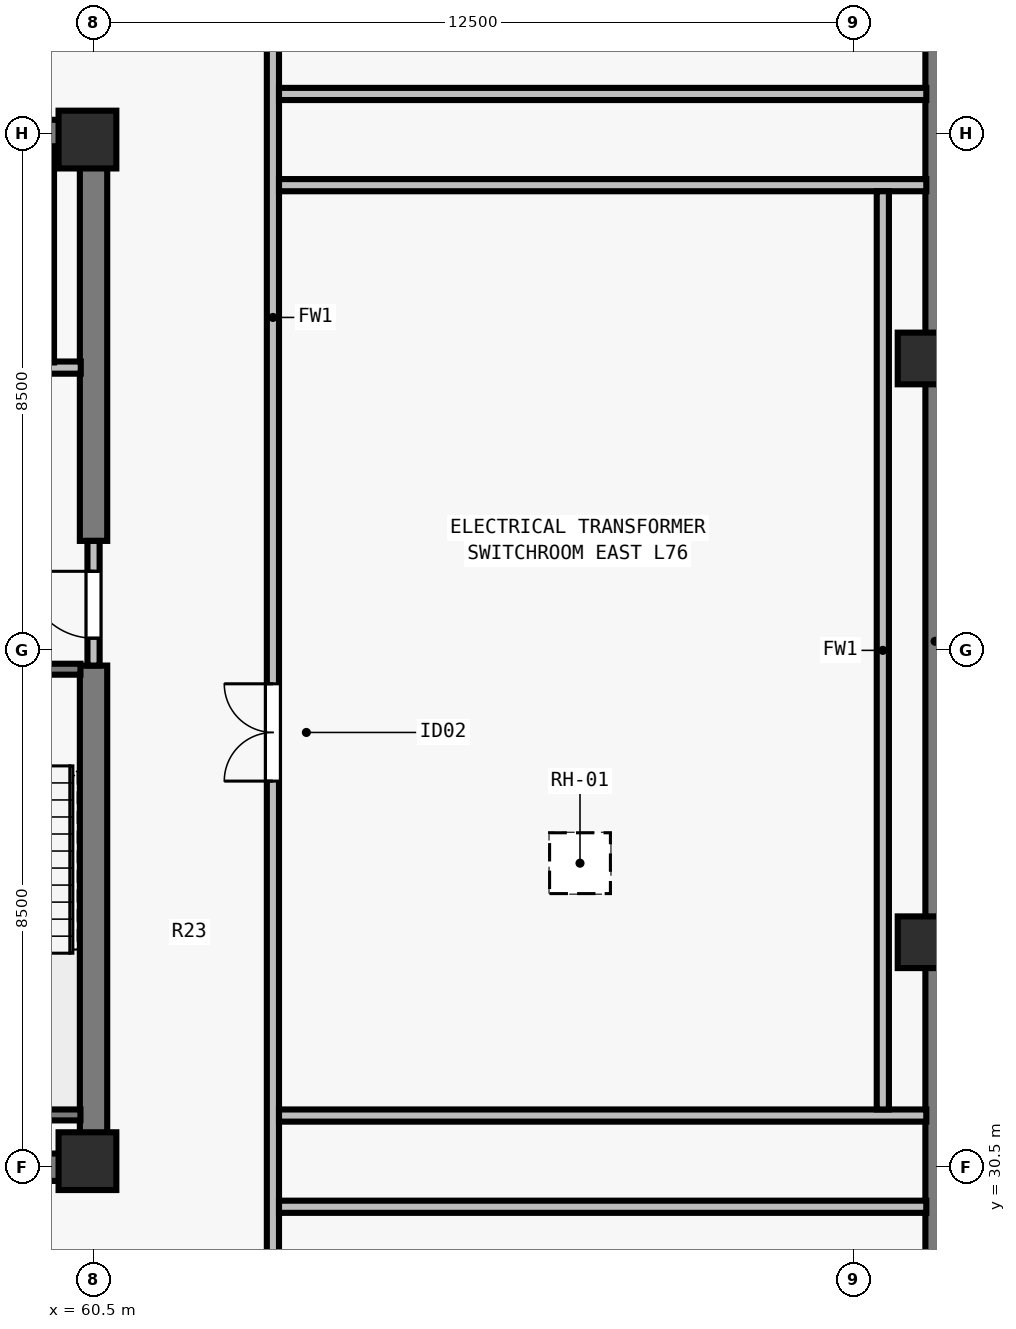
"""IFC4 building model, lengths in metres.
Left out: names, types, materials, properties, quantities, classifications, styles, units other than length and angle.
Written with IfcOpenShell. Run it as: python <this file> out.ifc"""

import sys

from ifc_helpers import new_model, si_unit, direction, frame, frame_2d, origin, origin_2d, place, context, subcontext, project, spatial, rectangle, extrude, element, fill, save


model = new_model("IFC4")
c1 = context("Model", 3, precision=1e-05, world=origin(), true_north=direction((0.0, 1.0)))
c2 = subcontext(c1, "Body", "Model", "MODEL_VIEW")
j1 = project(units=[si_unit("LENGTHUNIT", "METRE"), si_unit("PLANEANGLEUNIT", "RADIAN")], contexts=[c1])
p1 = place(None, origin())
s1 = spatial("IfcSite", under=j1, at=p1, CompositionType="ELEMENT")
p2 = place(p1, origin())
s2 = spatial("IfcBuilding", under=s1, at=p2, CompositionType="ELEMENT")
p3 = place(p2, frame((0.0, 0.0, 276.0)))
s3 = spatial("IfcBuildingStorey", under=s2, at=p3, CompositionType="ELEMENT", Elevation=276.0)
for number, where, z_axis, x_axis in (
    (1, (60.4, 30.6, 0.0), (0.0, 0.0, 1.0), (1.0, 0.0, 0.0)),
    (2, (60.4, 47.4, 0.0), (0.0, 0.0, 1.0), (1.0, 0.0, 0.0)),
):
    element("IfcColumn", number, at=place(p3, frame(where, z_axis=z_axis, x_axis=x_axis)), inside=s3, PredefinedType="COLUMN", context=c2, shape_type="SweptSolid", body=[
        extrude(rectangle(XDim=0.95, YDim=0.95, at=origin_2d()), origin(), (0.0, 0.0, 1.0), 4.5),
    ])
for number, where, z_axis, x_axis in (
    (3, (74.15, 34.2, 0.0), (0.0, 0.0, 1.0), (0.0, 1.0, 0.0)),
    (4, (74.15, 43.8, 0.0), (0.0, 0.0, 1.0), (0.0, 1.0, 0.0)),
):
    element("IfcColumn", number, at=place(p3, frame(where, z_axis=z_axis, x_axis=x_axis)), inside=s3, PredefinedType="COLUMN", context=c2, shape_type="SweptSolid", body=[
        extrude(rectangle(XDim=0.85, YDim=0.85, at=origin_2d()), origin(), (0.0, 0.0, 1.0), 4.5),
    ])
p4 = place(p3, frame((74.34, 56.5, 0.0), z_axis=(0.0, 0.0, 1.0), x_axis=(0.0, -1.0, 0.0)))
e5 = element("IfcWall", 5, at=p4, inside=s3, PredefinedType="SOLIDWALL", context=c2, shape_type="SweptSolid", body=[
    extrude(rectangle(XDim=34.702, YDim=0.32, at=frame_2d((17.351, 0.0))), origin(), (0.0, 0.0, 1.0), 4.29),
])
for number, where, z_axis, x_axis in (
    (6, (43.275, 30.5, 0.0), (0.0, 0.0, 1.0), (1.0, 0.0, 0.0)),
    (7, (43.275, 47.5, 0.0), (0.0, 0.0, 1.0), (1.0, 0.0, 0.0)),
):
    element("IfcWall", number, at=place(p3, frame(where, z_axis=z_axis, x_axis=x_axis)), inside=s3, PredefinedType="SHEAR", context=c2, shape_type="SweptSolid", body=[
        extrude(rectangle(XDim=17.45, YDim=0.45, at=frame_2d((8.725, 0.0))), origin(), (0.0, 0.0, 1.0), 4.29),
    ])
p5 = place(p3, frame((60.5, 30.715, 0.0), z_axis=(0.0, 0.0, 1.0), x_axis=(0.0, 1.0, 0.0)))
e8 = element("IfcWall", 8, at=p5, inside=s3, PredefinedType="SHEAR", context=c2, shape_type="SweptSolid", body=[
    extrude(rectangle(XDim=8.035, YDim=0.45, at=frame_2d((4.018, 0.0))), origin(), (0.0, 0.0, 1.0), 4.29),
])
p6 = place(p3, frame((60.5, 40.8, 0.0), z_axis=(0.0, 0.0, 1.0), x_axis=(0.0, 1.0, 0.0)))
e9 = element("IfcWall", 9, at=p6, inside=s3, PredefinedType="SHEAR", context=c2, shape_type="SweptSolid", body=[
    extrude(rectangle(XDim=6.485, YDim=0.45, at=frame_2d((3.242, 0.0))), origin(), (0.0, 0.0, 1.0), 4.29),
])
p7 = place(p3, frame((60.5, 38.75, 0.0), z_axis=(0.0, 0.0, 1.0), x_axis=(0.0, 1.0, 0.0)))
e10 = element("IfcWall", 10, at=p7, inside=s3, PredefinedType="SOLIDWALL", context=c2, shape_type="SweptSolid", body=[
    extrude(rectangle(XDim=2.05, YDim=0.2, at=frame_2d((1.025, 0.0))), origin(), (0.0, 0.0, 1.0), 4.29),
])
p8 = place(p7, frame((0.45, 0.0, 0.0)))
e11 = element("IfcOpeningElement", 11, at=p8, cuts=e10, PredefinedType="OPENING", context=c2, shape_type="SweptSolid", body=[
    extrude(rectangle(XDim=1.1, YDim=2.15, at=frame_2d((0.55, 1.075))), frame((0.0, 0.11, 0.0), z_axis=(0.0, -1.0, 0.0), x_axis=(1.0, 0.0, 0.0)), (0.0, 0.0, 1.0), 0.22),
])
p9 = place(p3, frame((56.735, 43.65, 0.0), z_axis=(0.0, 0.0, 1.0), x_axis=(1.0, 0.0, 0.0)))
e12 = element("IfcWall", 12, at=p9, inside=s3, PredefinedType="SOLIDWALL", context=c2, shape_type="SweptSolid", body=[
    extrude(rectangle(XDim=3.555, YDim=0.2, at=frame_2d((1.777, 0.0))), origin(), (0.0, 0.0, 1.0), 4.29),
])
p10 = place(p9, frame((1.295, 0.0, 0.0)))
e13 = element("IfcOpeningElement", 13, at=p10, cuts=e12, PredefinedType="OPENING", context=c2, shape_type="SweptSolid", body=[
    extrude(rectangle(XDim=1.1, YDim=2.2, at=frame_2d((0.55, 1.1))), frame((0.0, 0.11, 0.0), z_axis=(0.0, -1.0, 0.0), x_axis=(1.0, 0.0, 0.0)), (0.0, 0.0, 1.0), 0.22),
])
p11 = place(p3, frame((59.75, 43.735, 0.0), z_axis=(0.0, 0.0, 1.0), x_axis=(0.0, 1.0, 0.0)))
e14 = element("IfcWall", 14, at=p11, inside=s3, PredefinedType="SOLIDWALL", context=c2, shape_type="SweptSolid", body=[
    extrude(rectangle(XDim=3.555, YDim=0.2, at=frame_2d((1.777, 0.0))), origin(), (0.0, 0.0, 1.0), 4.29),
])
p12 = place(p3, frame((63.45, 27.65, 0.0), z_axis=(0.0, 0.0, 1.0), x_axis=(0.0, 1.0, 0.0)))
e15 = element("IfcWall", 15, at=p12, inside=s3, PredefinedType="SOLIDWALL", context=c2, shape_type="SweptSolid", body=[
    extrude(rectangle(XDim=22.7, YDim=0.2, at=frame_2d((11.35, 0.0))), origin(), (0.0, 0.0, 1.0), 4.29),
])
p13 = place(p12, frame((9.2, 0.0, 0.0)))
e16 = element("IfcOpeningElement", 16, at=p13, cuts=e15, PredefinedType="OPENING", context=c2, shape_type="SweptSolid", body=[
    extrude(rectangle(XDim=1.6, YDim=2.2, at=frame_2d((0.8, 1.1))), frame((0.0, 0.11, 0.0), z_axis=(0.0, -1.0, 0.0), x_axis=(1.0, 0.0, 0.0)), (0.0, 0.0, 1.0), 0.22),
])
p14 = place(p3, frame((63.55, 29.85, 0.0), z_axis=(0.0, 0.0, 1.0), x_axis=(1.0, 0.0, 0.0)))
e17 = element("IfcWall", 17, at=p14, inside=s3, PredefinedType="SOLIDWALL", context=c2, shape_type="SweptSolid", body=[
    extrude(rectangle(XDim=10.645, YDim=0.2, at=frame_2d((5.323, 0.0))), origin(), (0.0, 0.0, 1.0), 4.29),
])
for number, where, z_axis, x_axis in (
    (18, (63.55, 31.35, 0.0), (0.0, 0.0, 1.0), (1.0, 0.0, 0.0)),
    (19, (63.55, 46.65, 0.0), (0.0, 0.0, 1.0), (1.0, 0.0, 0.0)),
):
    element("IfcWall", number, at=place(p3, frame(where, z_axis=z_axis, x_axis=x_axis)), inside=s3, PredefinedType="SOLIDWALL", context=c2, shape_type="SweptSolid", body=[
        extrude(rectangle(XDim=10.645, YDim=0.2, at=frame_2d((5.323, 0.0))), origin(), (0.0, 0.0, 1.0), 2.465),
    ])
p15 = place(p3, frame((63.55, 48.15, 0.0), z_axis=(0.0, 0.0, 1.0), x_axis=(1.0, 0.0, 0.0)))
e20 = element("IfcWall", 20, at=p15, inside=s3, PredefinedType="SOLIDWALL", context=c2, shape_type="SweptSolid", body=[
    extrude(rectangle(XDim=10.645, YDim=0.2, at=frame_2d((5.323, 0.0))), origin(), (0.0, 0.0, 1.0), 4.29),
])
p16 = place(p3, frame((73.48, 31.45, 0.0), z_axis=(0.0, 0.0, 1.0), x_axis=(0.0, 1.0, 0.0)))
e21 = element("IfcWall", 21, at=p16, inside=s3, PredefinedType="SOLIDWALL", context=c2, shape_type="SweptSolid", body=[
    extrude(rectangle(XDim=15.1, YDim=0.2, at=frame_2d((7.55, 0.0))), origin(), (0.0, 0.0, 1.0), 4.29),
])
p17 = place(p3, frame((57.005, 38.69, 0.0), z_axis=(0.0, 0.0, 1.0), x_axis=(1.0, 0.0, 0.0)))
e22 = element("IfcWall", 22, at=p17, inside=s3, PredefinedType="SOLIDWALL", context=c2, shape_type="SweptSolid", body=[
    extrude(rectangle(XDim=3.28, YDim=0.18, at=frame_2d((1.64, 0.0))), origin(), (0.0, 0.0, 1.0), 4.29),
])
p18 = place(p17, frame((1.165, 0.0, 0.0)))
e23 = element("IfcOpeningElement", 23, at=p18, cuts=e22, PredefinedType="OPENING", context=c2, shape_type="SweptSolid", body=[
    extrude(rectangle(XDim=0.95, YDim=2.15, at=frame_2d((0.475, 1.075))), frame((0.0, 0.1, 0.0), z_axis=(0.0, -1.0, 0.0), x_axis=(1.0, 0.0, 0.0)), (0.0, 0.0, 1.0), 0.2),
])
p19 = place(p3, frame((57.005, 31.36, 0.0), z_axis=(0.0, 0.0, 1.0), x_axis=(1.0, 0.0, 0.0)))
e24 = element("IfcWall", 24, at=p19, inside=s3, PredefinedType="SOLIDWALL", context=c2, shape_type="SweptSolid", body=[
    extrude(rectangle(XDim=3.28, YDim=0.18, at=frame_2d((1.64, 0.0))), origin(), (0.0, 0.0, 1.0), 4.29),
])
p20 = place(p3, frame((0.0, 0.0, -0.26)))
p21 = place(p20, frame((68.5, 35.5, 0.0)))
p22 = place(p21, frame((0.0, 0.0, 0.21)))
e25 = element("IfcDoor", 25, at=p22, inside=s3, OperationType="SINGLE_SWING_LEFT", PredefinedType="TRAPDOOR", context=c2, shape_type="SweptSolid", body=[
    extrude(rectangle(XDim=1.0, YDim=1.0, at=origin_2d()), origin(), (0.0, 0.0, 1.0), 0.05),
])
p23 = place(p8, origin())
e26 = element("IfcDoor", 26, at=p23, inside=s3, OperationType="SINGLE_SWING_RIGHT", PredefinedType="DOOR", context=c2, shape_type="SweptSolid", body=[
    extrude(rectangle(XDim=1.1, YDim=2.15, at=frame_2d((0.55, 1.075))), frame((0.0, 0.025, 0.0), z_axis=(0.0, -1.0, 0.0), x_axis=(1.0, 0.0, 0.0)), (0.0, 0.0, 1.0), 0.05),
])
fill(e11, e26)
p24 = place(p13, origin())
e27 = element("IfcDoor", 27, at=p24, inside=s3, OperationType="DOUBLE_DOOR_SINGLE_SWING", PredefinedType="DOOR", context=c2, shape_type="SweptSolid", body=[
    extrude(rectangle(XDim=1.6, YDim=2.2, at=frame_2d((0.8, 1.1))), frame((0.0, 0.025, 0.0), z_axis=(0.0, -1.0, 0.0), x_axis=(1.0, 0.0, 0.0)), (0.0, 0.0, 1.0), 0.05),
])
fill(e16, e27)
save(model, sys.argv[1])
